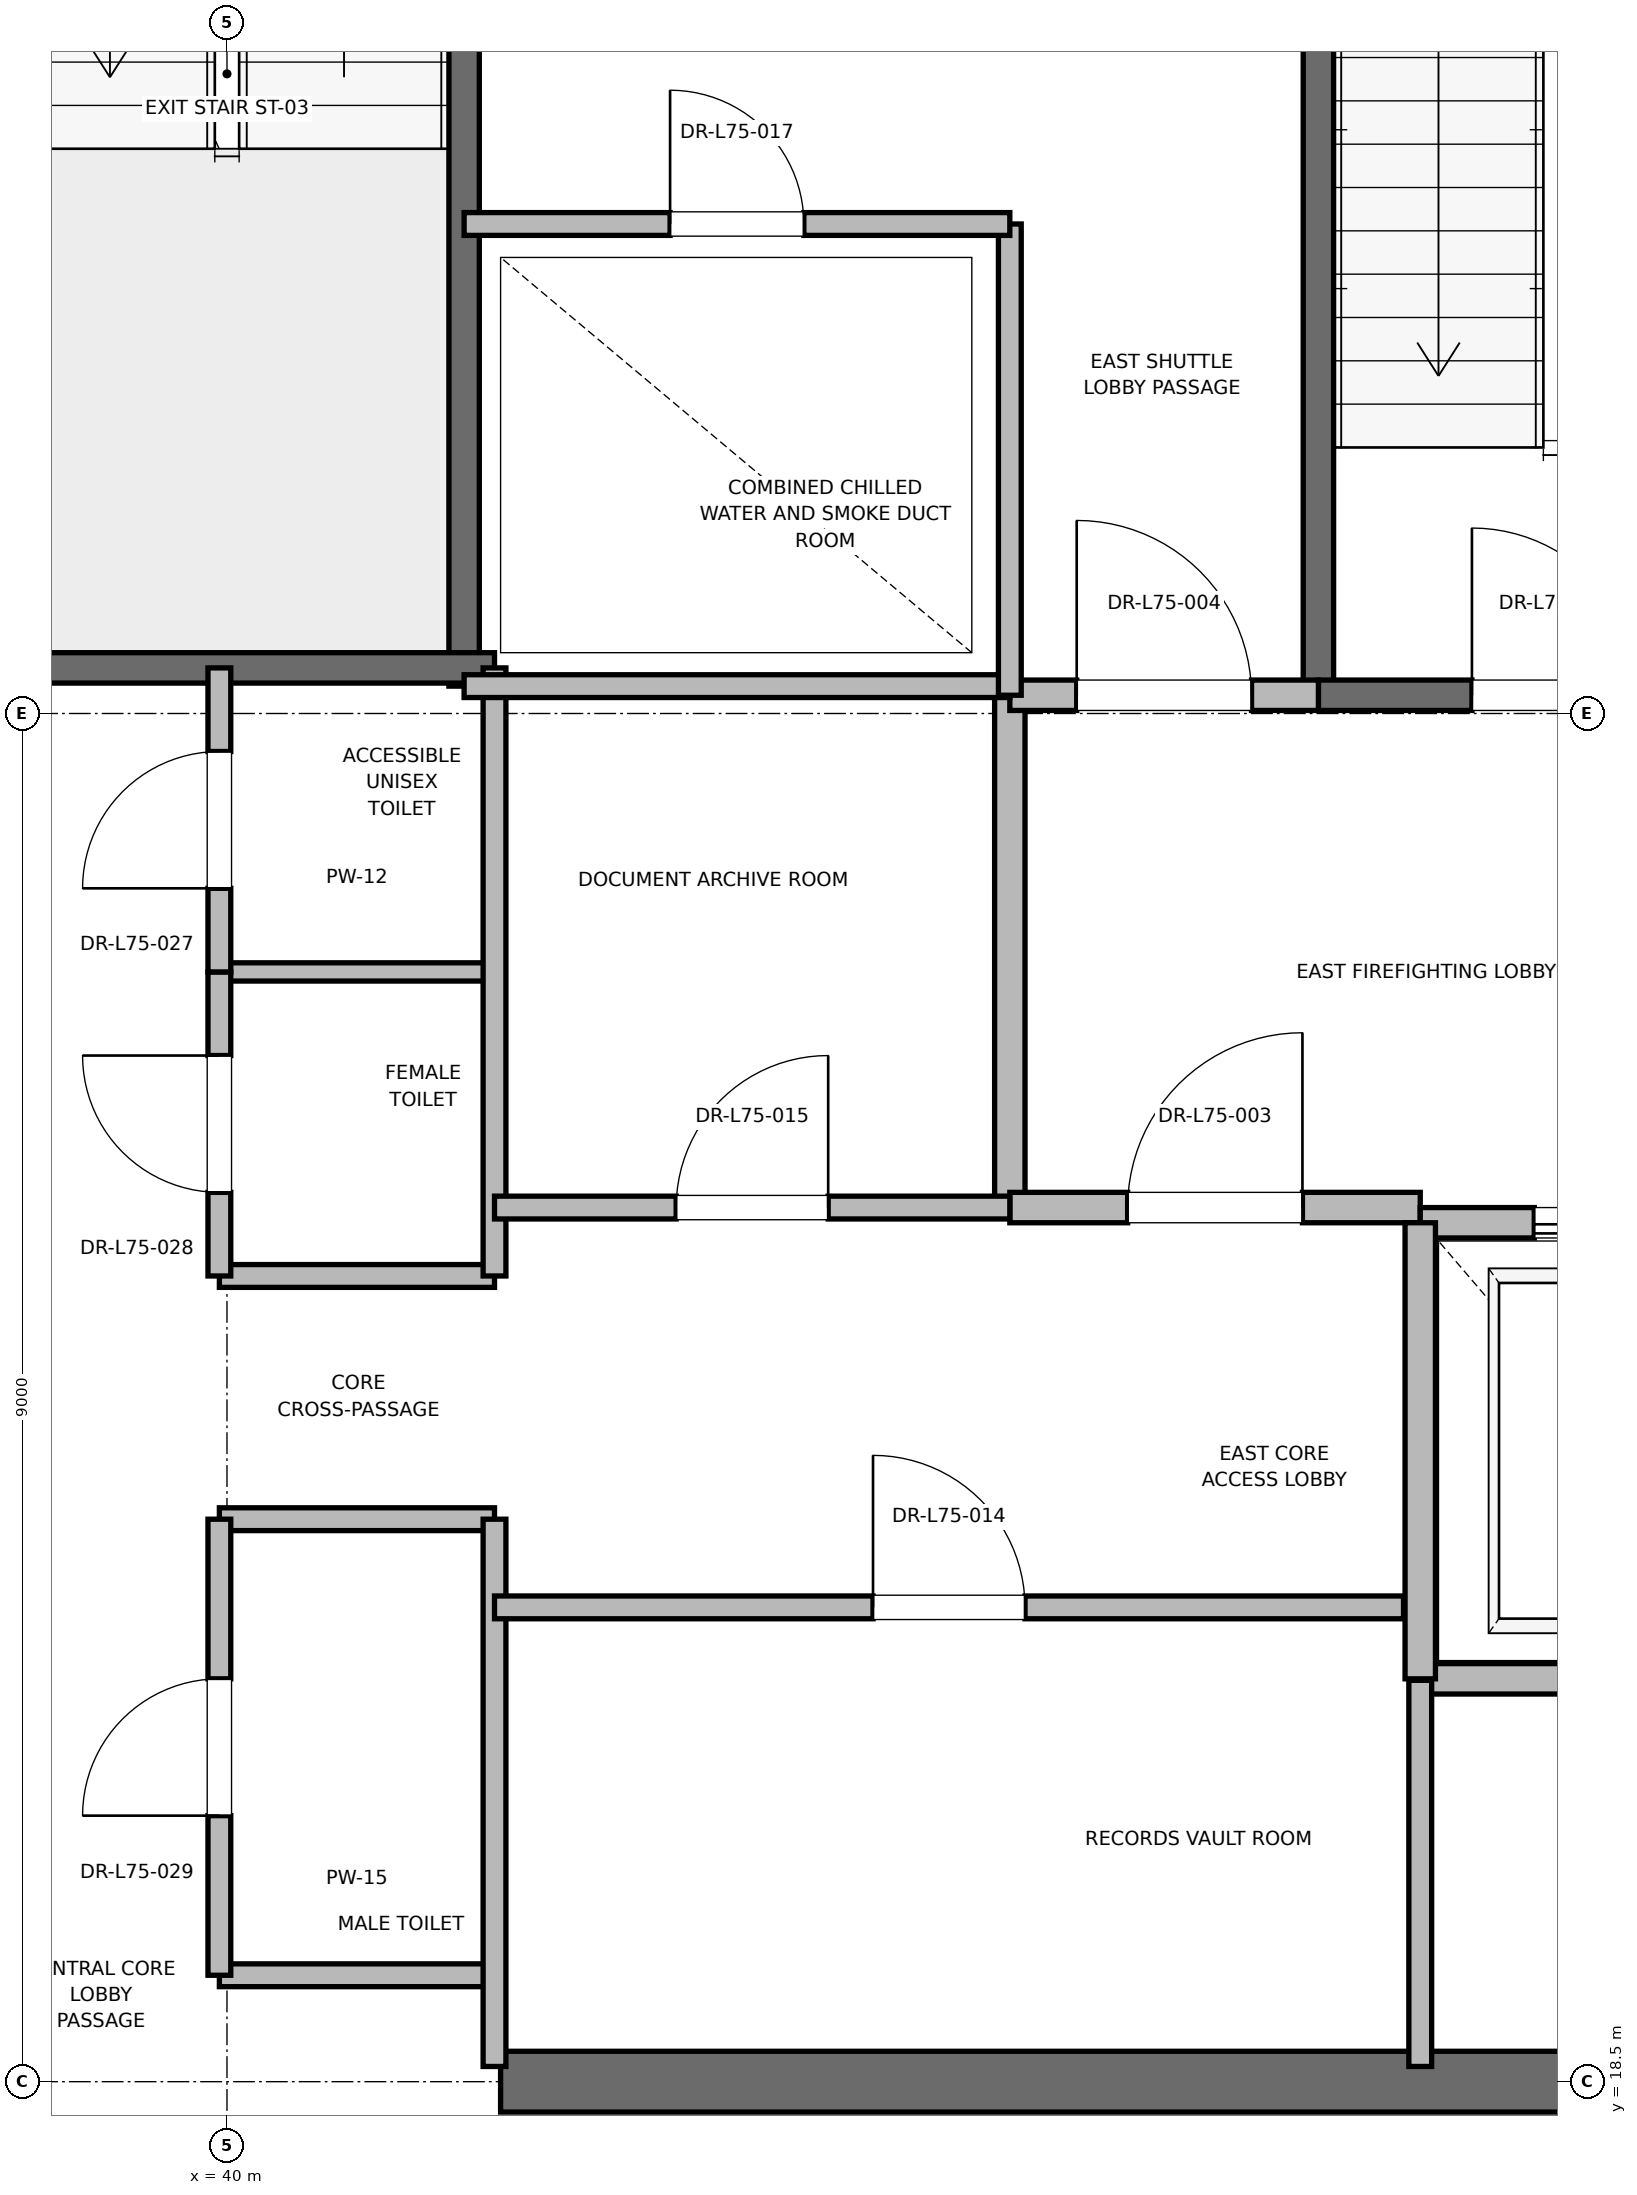
"""IFC4 building model, lengths in metres.
Left out: names, types, materials, properties, quantities, classifications, styles, units other than length and angle.
Written with IfcOpenShell. Run it as: python <this file> out.ifc"""

import sys

from ifc_helpers import new_model, si_unit, direction, frame, frame_2d, origin, place, context, subcontext, project, spatial, rectangle, extrude, element, fill, save


model = new_model("IFC4")
c1 = context("Model", 3, precision=1e-05, world=origin(), true_north=direction((0.0, 1.0)))
c2 = subcontext(c1, "Body", "Model", "MODEL_VIEW")
j1 = project(units=[si_unit("LENGTHUNIT", "METRE"), si_unit("PLANEANGLEUNIT", "RADIAN")], contexts=[c1])
p1 = place(None, origin())
s1 = spatial("IfcSite", under=j1, at=p1, CompositionType="ELEMENT")
p2 = place(p1, origin())
s2 = spatial("IfcBuilding", under=s1, at=p2, CompositionType="ELEMENT")
p3 = place(p2, frame((0.0, 0.0, 322.8)))
s3 = spatial("IfcBuildingStorey", under=s2, at=p3, CompositionType="ELEMENT", Elevation=322.8)
p4 = place(p3, frame((41.8, 18.5, 0.0), z_axis=(0.0, 0.0, 1.0), x_axis=(1.0, 0.0, 0.0)))
e1 = element("IfcWall", 1, at=p4, inside=s3, PredefinedType="SHEAR", context=c2, shape_type="SweptSolid", body=[
    extrude(rectangle(XDim=9.2, YDim=0.4, at=frame_2d((4.6, 0.0))), origin(), (0.0, 0.0, 1.0), 3.785),
])
p5 = place(p3, frame((47.18, 27.62, 0.0), z_axis=(0.0, 0.0, 1.0), x_axis=(0.0, 1.0, 0.0)))
e2 = element("IfcWall", 2, at=p5, inside=s3, PredefinedType="SOLIDWALL", context=c2, shape_type="SweptSolid", body=[
    extrude(rectangle(XDim=8.18, YDim=0.2, at=frame_2d((4.09, 0.0))), origin(), (0.0, 0.0, 1.0), 3.785),
])
p6 = place(p3, frame((47.18, 27.62, 0.0), z_axis=(0.0, 0.0, 1.0), x_axis=(1.0, 0.0, 0.0)))
e3 = element("IfcWall", 3, at=p6, inside=s3, PredefinedType="SOLIDWALL", context=c2, shape_type="SweptSolid", body=[
    extrude(rectangle(XDim=3.12, YDim=0.2, at=frame_2d((1.56, 0.0))), origin(), (0.0, 0.0, 1.0), 3.785),
])
p7 = place(p6, frame((1.01, 0.0, 0.0)))
e4 = element("IfcOpeningElement", 4, at=p7, cuts=e3, PredefinedType="OPENING", context=c2, shape_type="SweptSolid", body=[
    extrude(rectangle(XDim=1.1, YDim=2.15, at=frame_2d((0.55, 1.075))), frame((0.0, 0.1, 0.0), z_axis=(0.0, -1.0, 0.0), x_axis=(1.0, 0.0, 0.0)), (0.0, 0.0, 1.0), 0.2),
])
p8 = place(p3, frame((41.56, 27.68, 0.0), z_axis=(0.0, 0.0, 1.0), x_axis=(0.0, 1.0, 0.0)))
e5 = element("IfcWall", 5, at=p8, inside=s3, PredefinedType="SOLIDWALL", context=c2, shape_type="SweptSolid", body=[
    extrude(rectangle(XDim=8.57, YDim=0.2, at=frame_2d((4.285, 0.0))), origin(), (0.0, 0.0, 1.0), 3.785),
])
p9 = place(p3, frame((38.44, 27.8, 0.0), z_axis=(0.0, 0.0, 1.0), x_axis=(1.0, 0.0, 0.0)))
e6 = element("IfcWall", 6, at=p9, inside=s3, PredefinedType="SOLIDWALL", context=c2, shape_type="SweptSolid", body=[
    extrude(rectangle(XDim=3.32, YDim=0.2, at=frame_2d((1.66, 0.0))), origin(), (0.0, 0.0, 1.0), 3.785),
])
p10 = place(p3, frame((45.15, 24.25, 0.0), z_axis=(0.0, 0.0, 1.0), x_axis=(0.0, 1.0, 0.0)))
e7 = element("IfcWall", 7, at=p10, inside=s3, PredefinedType="PARTITIONING", context=c2, shape_type="SweptSolid", body=[
    extrude(rectangle(XDim=3.37, YDim=0.2, at=frame_2d((1.685, 0.0))), origin(), (0.0, 0.0, 1.0), 3.785),
])
p11 = place(p3, frame((45.15, 24.25, 0.0), z_axis=(0.0, 0.0, 1.0), x_axis=(1.0, 0.0, 0.0)))
e8 = element("IfcWall", 8, at=p11, inside=s3, PredefinedType="PARTITIONING", context=c2, shape_type="SweptSolid", body=[
    extrude(rectangle(XDim=2.7, YDim=0.2, at=frame_2d((1.35, 0.0))), origin(), (0.0, 0.0, 1.0), 3.785),
])
p12 = place(p11, frame((0.775, 0.0, 0.0)))
e9 = element("IfcOpeningElement", 9, at=p12, cuts=e8, PredefinedType="OPENING", context=c2, shape_type="SweptSolid", body=[
    extrude(rectangle(XDim=1.15, YDim=2.2, at=frame_2d((0.575, 1.1))), frame((0.0, 0.1, 0.0), z_axis=(0.0, -1.0, 0.0), x_axis=(1.0, 0.0, 0.0)), (0.0, 0.0, 1.0), 0.2),
])
p13 = place(p3, frame((45.15, 27.62, 0.0), z_axis=(0.0, 0.0, 1.0), x_axis=(1.0, 0.0, 0.0)))
e10 = element("IfcWall", 10, at=p13, inside=s3, PredefinedType="PARTITIONING", context=c2, shape_type="SweptSolid", body=[
    extrude(rectangle(XDim=2.03, YDim=0.2, at=frame_2d((1.015, 0.0))), origin(), (0.0, 0.0, 1.0), 3.785),
])
p14 = place(p13, frame((0.44, 0.0, 0.0)))
e11 = element("IfcOpeningElement", 11, at=p14, cuts=e10, PredefinedType="OPENING", context=c2, shape_type="SweptSolid", body=[
    extrude(rectangle(XDim=1.15, YDim=2.2, at=frame_2d((0.575, 1.1))), frame((0.0, 0.1, 0.0), z_axis=(0.0, -1.0, 0.0), x_axis=(1.0, 0.0, 0.0)), (0.0, 0.0, 1.0), 0.2),
])
p15 = place(p3, frame((47.85, 21.15, 0.0), z_axis=(0.0, 0.0, 1.0), x_axis=(1.0, 0.0, 0.0)))
e12 = element("IfcWall", 12, at=p15, inside=s3, PredefinedType="SOLIDWALL", context=c2, shape_type="SweptSolid", body=[
    extrude(rectangle(XDim=2.6, YDim=0.2, at=frame_2d((1.3, 0.0))), origin(), (0.0, 0.0, 1.0), 3.785),
])
p16 = place(p3, frame((50.45, 24.15, 0.0), z_axis=(0.0, 0.0, 1.0), x_axis=(-1.0, 0.0, 0.0)))
e13 = element("IfcWall", 13, at=p16, inside=s3, PredefinedType="SOLIDWALL", context=c2, shape_type="SweptSolid", body=[
    extrude(rectangle(XDim=2.6, YDim=0.2, at=frame_2d((1.3, 0.0))), origin(), (0.0, 0.0, 1.0), 2.865),
])
p17 = place(p16, frame((0.75, 0.0, 0.0)))
e14 = element("IfcOpeningElement", 14, at=p17, cuts=e13, PredefinedType="OPENING", context=c2, shape_type="SweptSolid", body=[
    extrude(rectangle(XDim=1.1, YDim=2.2, at=frame_2d((0.55, 1.1))), frame((0.0, 0.1, 0.0), z_axis=(0.0, -1.0, 0.0), x_axis=(1.0, 0.0, 0.0)), (0.0, 0.0, 1.0), 0.2),
])
p18 = place(p3, frame((47.85, 24.15, 0.0), z_axis=(0.0, 0.0, 1.0), x_axis=(0.0, -1.0, 0.0)))
e15 = element("IfcWall", 15, at=p18, inside=s3, PredefinedType="SOLIDWALL", context=c2, shape_type="SweptSolid", body=[
    extrude(rectangle(XDim=3.0, YDim=0.2, at=frame_2d((1.5, 0.0))), origin(), (0.0, 0.0, 1.0), 3.785),
])
for number, where, z_axis, x_axis in (
    (16, (39.95, 19.2, 0.0), (0.0, 0.0, 1.0), (1.0, 0.0, 0.0)),
    (17, (39.95, 22.2, 0.0), (0.0, 0.0, 1.0), (1.0, 0.0, 0.0)),
    (18, (39.95, 23.8, 0.0), (0.0, 0.0, 1.0), (1.0, 0.0, 0.0)),
):
    element("IfcWall", number, at=place(p3, frame(where, z_axis=z_axis, x_axis=x_axis)), inside=s3, PredefinedType="PARTITIONING", context=c2, shape_type="SweptSolid", body=[
        extrude(rectangle(XDim=1.81, YDim=0.15, at=frame_2d((0.905, 0.0))), origin(), (0.0, 0.0, 1.0), 2.85),
    ])
p19 = place(p3, frame((39.95, 25.8, 0.0), z_axis=(0.0, 0.0, 1.0), x_axis=(1.0, 0.0, 0.0)))
e19 = element("IfcWall", 19, at=p19, inside=s3, PredefinedType="PARTITIONING", context=c2, shape_type="SweptSolid", body=[
    extrude(rectangle(XDim=1.81, YDim=0.12, at=frame_2d((0.905, 0.0))), origin(), (0.0, 0.0, 1.0), 2.85),
])
p20 = place(p3, frame((41.76, 18.6, 0.0), z_axis=(0.0, 0.0, 1.0), x_axis=(0.0, 1.0, 0.0)))
e20 = element("IfcWall", 20, at=p20, inside=s3, PredefinedType="PARTITIONING", context=c2, shape_type="SweptSolid", body=[
    extrude(rectangle(XDim=3.6, YDim=0.15, at=frame_2d((1.8, 0.0))), origin(), (0.0, 0.0, 1.0), 2.85),
])
p21 = place(p3, frame((41.76, 23.8, 0.0), z_axis=(0.0, 0.0, 1.0), x_axis=(0.0, 1.0, 0.0)))
e21 = element("IfcWall", 21, at=p21, inside=s3, PredefinedType="PARTITIONING", context=c2, shape_type="SweptSolid", body=[
    extrude(rectangle(XDim=4.0, YDim=0.15, at=frame_2d((2.0, 0.0))), origin(), (0.0, 0.0, 1.0), 2.85),
])
p22 = place(p3, frame((39.95, 19.2, 0.0), z_axis=(0.0, 0.0, 1.0), x_axis=(0.0, 1.0, 0.0)))
e22 = element("IfcWall", 22, at=p22, inside=s3, PredefinedType="PARTITIONING", context=c2, shape_type="SweptSolid", body=[
    extrude(rectangle(XDim=3.0, YDim=0.15, at=frame_2d((1.5, 0.0))), origin(), (0.0, 0.0, 1.0), 2.85),
])
p23 = place(p22, frame((1.05, 0.0, 0.0)))
e23 = element("IfcOpeningElement", 23, at=p23, cuts=e22, PredefinedType="OPENING", context=c2, shape_type="SweptSolid", body=[
    extrude(rectangle(XDim=0.9, YDim=2.1, at=frame_2d((0.45, 1.05))), frame((0.0, 0.075, 0.0), z_axis=(0.0, -1.0, 0.0), x_axis=(1.0, 0.0, 0.0)), (0.0, 0.0, 1.0), 0.15),
])
p24 = place(p3, frame((39.95, 23.8, 0.0), z_axis=(0.0, 0.0, 1.0), x_axis=(0.0, 1.0, 0.0)))
e24 = element("IfcWall", 24, at=p24, inside=s3, PredefinedType="PARTITIONING", context=c2, shape_type="SweptSolid", body=[
    extrude(rectangle(XDim=2.0, YDim=0.15, at=frame_2d((1.0, 0.0))), origin(), (0.0, 0.0, 1.0), 2.85),
])
p25 = place(p24, frame((0.55, 0.0, 0.0)))
e25 = element("IfcOpeningElement", 25, at=p25, cuts=e24, PredefinedType="OPENING", context=c2, shape_type="SweptSolid", body=[
    extrude(rectangle(XDim=0.9, YDim=2.1, at=frame_2d((0.45, 1.05))), frame((0.0, 0.075, 0.0), z_axis=(0.0, -1.0, 0.0), x_axis=(1.0, 0.0, 0.0)), (0.0, 0.0, 1.0), 0.15),
])
p26 = place(p3, frame((39.95, 25.8, 0.0), z_axis=(0.0, 0.0, 1.0), x_axis=(0.0, 1.0, 0.0)))
e26 = element("IfcWall", 26, at=p26, inside=s3, PredefinedType="PARTITIONING", context=c2, shape_type="SweptSolid", body=[
    extrude(rectangle(XDim=2.0, YDim=0.15, at=frame_2d((1.0, 0.0))), origin(), (0.0, 0.0, 1.0), 2.85),
])
p27 = place(p26, frame((0.55, 0.0, 0.0)))
e27 = element("IfcOpeningElement", 27, at=p27, cuts=e26, PredefinedType="OPENING", context=c2, shape_type="SweptSolid", body=[
    extrude(rectangle(XDim=0.9, YDim=2.1, at=frame_2d((0.45, 1.05))), frame((0.0, 0.075, 0.0), z_axis=(0.0, -1.0, 0.0), x_axis=(1.0, 0.0, 0.0)), (0.0, 0.0, 1.0), 0.15),
])
p28 = place(p3, frame((41.56, 27.68, 0.0), z_axis=(0.0, 0.0, 1.0), x_axis=(1.0, 0.0, 0.0)))
e28 = element("IfcWall", 28, at=p28, inside=s3, PredefinedType="PARTITIONING", context=c2, shape_type="SweptSolid", body=[
    extrude(rectangle(XDim=3.59, YDim=0.15, at=frame_2d((1.795, 0.0))), origin(), (0.0, 0.0, 1.0), 2.85),
])
p29 = place(p3, frame((47.85, 18.6, 0.0), z_axis=(0.0, 0.0, 1.0), x_axis=(0.0, 1.0, 0.0)))
e29 = element("IfcWall", 29, at=p29, inside=s3, PredefinedType="PARTITIONING", context=c2, shape_type="SweptSolid", body=[
    extrude(rectangle(XDim=2.54, YDim=0.15, at=frame_2d((1.27, 0.0))), origin(), (0.0, 0.0, 1.0), 2.85),
])
p30 = place(p3, frame((41.76, 21.62, 0.0), z_axis=(0.0, 0.0, 1.0), x_axis=(1.0, 0.0, 0.0)))
e30 = element("IfcWall", 30, at=p30, inside=s3, PredefinedType="PARTITIONING", context=c2, shape_type="SweptSolid", body=[
    extrude(rectangle(XDim=5.98, YDim=0.15, at=frame_2d((2.99, 0.0))), origin(), (0.0, 0.0, 1.0), 2.85),
])
p31 = place(p30, frame((2.49, 0.0, 0.0)))
e31 = element("IfcOpeningElement", 31, at=p31, cuts=e30, PredefinedType="OPENING", context=c2, shape_type="SweptSolid", body=[
    extrude(rectangle(XDim=1.0, YDim=2.15, at=frame_2d((0.5, 1.075))), frame((0.0, 0.075, 0.0), z_axis=(0.0, -1.0, 0.0), x_axis=(1.0, 0.0, 0.0)), (0.0, 0.0, 1.0), 0.15),
])
p32 = place(p3, frame((41.76, 24.25, 0.0), z_axis=(0.0, 0.0, 1.0), x_axis=(1.0, 0.0, 0.0)))
e32 = element("IfcWall", 32, at=p32, inside=s3, PredefinedType="PARTITIONING", context=c2, shape_type="SweptSolid", body=[
    extrude(rectangle(XDim=3.39, YDim=0.15, at=frame_2d((1.695, 0.0))), origin(), (0.0, 0.0, 1.0), 2.85),
])
p33 = place(p32, frame((1.195, 0.0, 0.0)))
e33 = element("IfcOpeningElement", 33, at=p33, cuts=e32, PredefinedType="OPENING", context=c2, shape_type="SweptSolid", body=[
    extrude(rectangle(XDim=1.0, YDim=2.15, at=frame_2d((0.5, 1.075))), frame((0.0, 0.075, 0.0), z_axis=(0.0, -1.0, 0.0), x_axis=(1.0, 0.0, 0.0)), (0.0, 0.0, 1.0), 0.15),
])
p34 = place(p3, frame((45.15, 27.62, 0.0), z_axis=(0.0, 0.0, 1.0), x_axis=(0.0, 1.0, 0.0)))
e34 = element("IfcWall", 34, at=p34, inside=s3, PredefinedType="PARTITIONING", context=c2, shape_type="SweptSolid", body=[
    extrude(rectangle(XDim=3.1, YDim=0.15, at=frame_2d((1.55, 0.0))), origin(), (0.0, 0.0, 1.0), 2.85),
])
p35 = place(p3, frame((41.56, 30.72, 0.0), z_axis=(0.0, 0.0, 1.0), x_axis=(1.0, 0.0, 0.0)))
e35 = element("IfcWall", 35, at=p35, inside=s3, PredefinedType="PARTITIONING", context=c2, shape_type="SweptSolid", body=[
    extrude(rectangle(XDim=3.59, YDim=0.15, at=frame_2d((1.795, 0.0))), origin(), (0.0, 0.0, 1.0), 2.85),
])
p36 = place(p35, frame((1.355, 0.0, 0.0)))
e36 = element("IfcOpeningElement", 36, at=p36, cuts=e35, PredefinedType="OPENING", context=c2, shape_type="SweptSolid", body=[
    extrude(rectangle(XDim=0.88, YDim=2.1, at=frame_2d((0.44, 1.05))), frame((0.0, 0.075, 0.0), z_axis=(0.0, -1.0, 0.0), x_axis=(1.0, 0.0, 0.0)), (0.0, 0.0, 1.0), 0.15),
])
p37 = place(p7, origin())
e37 = element("IfcDoor", 37, at=p37, inside=s3, OperationType="SINGLE_SWING_LEFT", PredefinedType="DOOR", context=c2, shape_type="SweptSolid", body=[
    extrude(rectangle(XDim=1.1, YDim=2.15, at=frame_2d((0.55, 1.075))), frame((0.0, 0.025, 0.0), z_axis=(0.0, -1.0, 0.0), x_axis=(1.0, 0.0, 0.0)), (0.0, 0.0, 1.0), 0.05),
])
fill(e4, e37)
p38 = place(p12, origin())
e38 = element("IfcDoor", 38, at=p38, inside=s3, OperationType="SINGLE_SWING_RIGHT", PredefinedType="DOOR", context=c2, shape_type="SweptSolid", body=[
    extrude(rectangle(XDim=1.15, YDim=2.2, at=frame_2d((0.575, 1.1))), frame((0.0, 0.025, 0.0), z_axis=(0.0, -1.0, 0.0), x_axis=(1.0, 0.0, 0.0)), (0.0, 0.0, 1.0), 0.05),
])
fill(e9, e38)
p39 = place(p14, origin())
e39 = element("IfcDoor", 39, at=p39, inside=s3, OperationType="SINGLE_SWING_LEFT", PredefinedType="DOOR", context=c2, shape_type="SweptSolid", body=[
    extrude(rectangle(XDim=1.15, YDim=2.2, at=frame_2d((0.575, 1.1))), frame((0.0, 0.025, 0.0), z_axis=(0.0, -1.0, 0.0), x_axis=(1.0, 0.0, 0.0)), (0.0, 0.0, 1.0), 0.05),
])
fill(e11, e39)
p40 = place(p17, origin())
e40 = element("IfcDoor", 40, at=p40, inside=s3, OperationType="SLIDING_TO_RIGHT", PredefinedType="DOOR", context=c2, shape_type="SweptSolid", body=[
    extrude(rectangle(XDim=1.1, YDim=2.2, at=frame_2d((0.55, 1.1))), frame((0.0, 0.025, 0.0), z_axis=(0.0, -1.0, 0.0), x_axis=(1.0, 0.0, 0.0)), (0.0, 0.0, 1.0), 0.05),
])
fill(e14, e40)
p41 = place(p23, origin())
e41 = element("IfcDoor", 41, at=p41, inside=s3, OperationType="SINGLE_SWING_LEFT", PredefinedType="DOOR", context=c2, shape_type="SweptSolid", body=[
    extrude(rectangle(XDim=0.9, YDim=2.1, at=frame_2d((0.45, 1.05))), frame((0.0, 0.025, 0.0), z_axis=(0.0, -1.0, 0.0), x_axis=(1.0, 0.0, 0.0)), (0.0, 0.0, 1.0), 0.05),
])
fill(e23, e41)
p42 = place(p25, origin())
e42 = element("IfcDoor", 42, at=p42, inside=s3, OperationType="SINGLE_SWING_RIGHT", PredefinedType="DOOR", context=c2, shape_type="SweptSolid", body=[
    extrude(rectangle(XDim=0.9, YDim=2.1, at=frame_2d((0.45, 1.05))), frame((0.0, 0.025, 0.0), z_axis=(0.0, -1.0, 0.0), x_axis=(1.0, 0.0, 0.0)), (0.0, 0.0, 1.0), 0.05),
])
fill(e25, e42)
p43 = place(p27, origin())
e43 = element("IfcDoor", 43, at=p43, inside=s3, OperationType="SINGLE_SWING_LEFT", PredefinedType="DOOR", context=c2, shape_type="SweptSolid", body=[
    extrude(rectangle(XDim=0.9, YDim=2.1, at=frame_2d((0.45, 1.05))), frame((0.0, 0.025, 0.0), z_axis=(0.0, -1.0, 0.0), x_axis=(1.0, 0.0, 0.0)), (0.0, 0.0, 1.0), 0.05),
])
fill(e27, e43)
p44 = place(p31, origin())
e44 = element("IfcDoor", 44, at=p44, inside=s3, OperationType="SINGLE_SWING_LEFT", PredefinedType="DOOR", context=c2, shape_type="SweptSolid", body=[
    extrude(rectangle(XDim=1.0, YDim=2.15, at=frame_2d((0.5, 1.075))), frame((0.0, 0.025, 0.0), z_axis=(0.0, -1.0, 0.0), x_axis=(1.0, 0.0, 0.0)), (0.0, 0.0, 1.0), 0.05),
])
fill(e31, e44)
p45 = place(p33, origin())
e45 = element("IfcDoor", 45, at=p45, inside=s3, OperationType="SINGLE_SWING_RIGHT", PredefinedType="DOOR", context=c2, shape_type="SweptSolid", body=[
    extrude(rectangle(XDim=1.0, YDim=2.15, at=frame_2d((0.5, 1.075))), frame((0.0, 0.025, 0.0), z_axis=(0.0, -1.0, 0.0), x_axis=(1.0, 0.0, 0.0)), (0.0, 0.0, 1.0), 0.05),
])
fill(e33, e45)
p46 = place(p36, origin())
e46 = element("IfcDoor", 46, at=p46, inside=s3, OperationType="SINGLE_SWING_LEFT", PredefinedType="DOOR", context=c2, shape_type="SweptSolid", body=[
    extrude(rectangle(XDim=0.88, YDim=2.1, at=frame_2d((0.44, 1.05))), frame((0.0, 0.025, 0.0), z_axis=(0.0, -1.0, 0.0), x_axis=(1.0, 0.0, 0.0)), (0.0, 0.0, 1.0), 0.05),
])
fill(e36, e46)
save(model, sys.argv[1])
